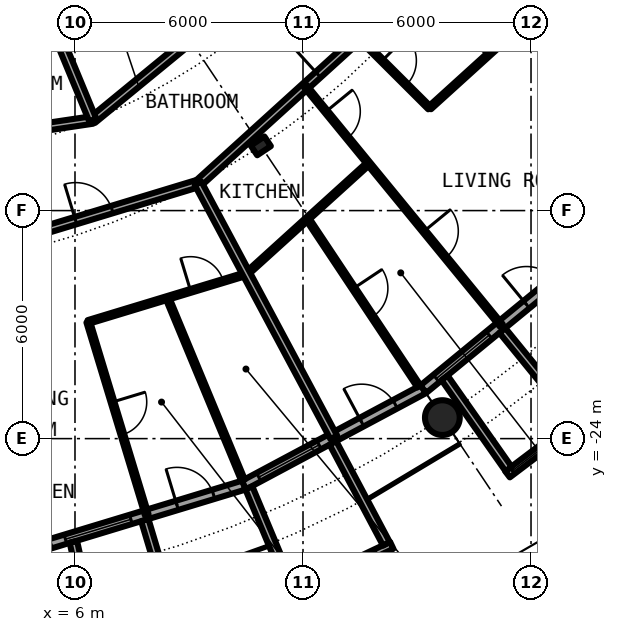
"""IFC4 building model, lengths in metres.
Left out: names, types, materials, properties, quantities, classifications, styles, units other than length and angle.
Written with IfcOpenShell. Run it as: python <this file> out.ifc"""

import sys

from ifc_helpers import new_model, si_unit, direction, frame, frame_2d, origin, origin_2d, place, context, subcontext, project, spatial, rectangle, circle, hollow_circle, i_section, extrude, element, fill, save


model = new_model("IFC4")
c1 = context("Model", 3, precision=1e-05, world=origin(), true_north=direction((0.0, 1.0)))
c2 = subcontext(c1, "Body", "Model", "MODEL_VIEW")
j1 = project(units=[si_unit("LENGTHUNIT", "METRE"), si_unit("PLANEANGLEUNIT", "RADIAN")], contexts=[c1])
p1 = place(None, origin())
s1 = spatial("IfcSite", under=j1, at=p1, CompositionType="ELEMENT")
p2 = place(p1, origin())
s2 = spatial("IfcBuilding", under=s1, at=p2, CompositionType="ELEMENT")
p3 = place(p2, frame((0.0, 0.0, 129.95)))
s3 = spatial("IfcBuildingStorey", under=s2, at=p3, CompositionType="ELEMENT", Elevation=129.95)
p4 = place(p3, frame((15.667, -23.448, 0.0), z_axis=(0.0, 0.0, 1.0), x_axis=(1.0, 0.0, 0.0)))
e1 = element("IfcColumn", 1, at=p4, inside=s3, PredefinedType="COLUMN", context=c2, shape_type="SweptSolid", body=[
    extrude(hollow_circle(Radius=0.457, WallThickness=0.04, at=origin_2d()), origin(), (0.0, 0.0, 1.0), 3.05),
])
p5 = place(p3, frame((10.889, -16.297, 0.0), z_axis=(0.0, 0.0, 1.0), x_axis=(0.55557023302, -0.831469612303, 0.0)))
e2 = element("IfcColumn", 2, at=p5, inside=s3, PredefinedType="COLUMN", context=c2, shape_type="SweptSolid", body=[
    extrude(i_section(OverallWidth=0.307, OverallDepth=0.432, WebThickness=0.021, FlangeThickness=0.04, FilletRadius=0.027, at=origin_2d()), origin(), (0.0, 0.0, 1.0), 3.05),
])
p6 = place(p3, frame((5.326, -26.775, 0.0), z_axis=(0.0, 0.0, 1.0), x_axis=(0.956965678721, 0.290201119486, 0.0)))
e3 = element("IfcWall", 3, at=p6, inside=s3, PredefinedType="SOLIDWALL", context=c2, shape_type="SweptSolid", body=[
    extrude(rectangle(XDim=5.351, YDim=0.25, at=frame_2d((2.676, 0.0))), origin(), (0.0, 0.0, 1.0), 2.7),
])
p7 = place(p6, frame((0.441, 0.0, 0.3)))
e4 = element("IfcOpeningElement", 4, at=p7, cuts=e3, PredefinedType="OPENING", context=c2, shape_type="SweptSolid", body=[
    extrude(rectangle(XDim=1.8, YDim=2.1, at=frame_2d((0.9, 1.05))), frame((0.0, 0.135, 0.0), z_axis=(0.0, -1.0, 0.0), x_axis=(1.0, 0.0, 0.0)), (0.0, 0.0, 1.0), 0.27),
])
p8 = place(p6, frame((3.51, 0.0, 0.0)))
e5 = element("IfcOpeningElement", 5, at=p8, cuts=e3, PredefinedType="OPENING", context=c2, shape_type="SweptSolid", body=[
    extrude(rectangle(XDim=1.0, YDim=2.2, at=frame_2d((0.5, 1.1))), frame((0.0, 0.135, 0.0), z_axis=(0.0, -1.0, 0.0), x_axis=(1.0, 0.0, 0.0)), (0.0, 0.0, 1.0), 0.27),
])
p9 = place(p3, frame((5.957, -26.715, -0.03), z_axis=(0.0, 0.0, 1.0), x_axis=(0.217857287091, -0.975980636315, 0.0)))
e6 = element("IfcWall", 6, at=p9, inside=s3, PredefinedType="SOLIDWALL", context=c2, shape_type="SweptSolid", body=[
    extrude(rectangle(XDim=2.928, YDim=0.2, at=frame_2d((1.464, 0.0))), origin(), (0.0, 0.0, 1.0), 2.73),
])
p10 = place(p3, frame((7.837, -26.144, -0.03), z_axis=(0.0, 0.0, 1.0), x_axis=(0.287064767992, -0.957911174889, 0.0)))
e7 = element("IfcWall", 7, at=p10, inside=s3, PredefinedType="SOLIDWALL", context=c2, shape_type="SweptSolid", body=[
    extrude(rectangle(XDim=3.006, YDim=0.2, at=frame_2d((1.503, 0.0))), origin(), (0.0, 0.0, 1.0), 2.73),
])
p11 = place(p3, frame((10.447, -25.222, 0.0), z_axis=(0.0, 0.0, 1.0), x_axis=(0.881915646801, 0.471407246368, 0.0)))
e8 = element("IfcWall", 8, at=p11, inside=s3, PredefinedType="SOLIDWALL", context=c2, shape_type="SweptSolid", body=[
    extrude(rectangle(XDim=5.352, YDim=0.25, at=frame_2d((2.676, 0.0))), origin(), (0.0, 0.0, 1.0), 2.7),
])
p12 = place(p11, frame((0.441, 0.0, 0.3)))
e9 = element("IfcOpeningElement", 9, at=p12, cuts=e8, PredefinedType="OPENING", context=c2, shape_type="SweptSolid", body=[
    extrude(rectangle(XDim=1.8, YDim=2.1, at=frame_2d((0.9, 1.05))), frame((0.0, 0.135, 0.0), z_axis=(0.0, -1.0, 0.0), x_axis=(1.0, 0.0, 0.0)), (0.0, 0.0, 1.0), 0.27),
])
p13 = place(p11, frame((3.51, 0.0, 0.0)))
e10 = element("IfcOpeningElement", 10, at=p13, cuts=e8, PredefinedType="OPENING", context=c2, shape_type="SweptSolid", body=[
    extrude(rectangle(XDim=1.0, YDim=2.2, at=frame_2d((0.5, 1.1))), frame((0.0, 0.135, 0.0), z_axis=(0.0, -1.0, 0.0), x_axis=(1.0, 0.0, 0.0)), (0.0, 0.0, 1.0), 0.27),
])
p14 = place(p3, frame((11.629, -28.088, -0.03), z_axis=(0.0, 0.0, 1.0), x_axis=(0.904000060331, 0.427532327342, 0.0)))
e11 = element("IfcWall", 11, at=p14, inside=s3, PredefinedType="SOLIDWALL", context=c2, shape_type="SweptSolid", body=[
    extrude(rectangle(XDim=2.993, YDim=0.2, at=frame_2d((1.497, 0.0))), origin(), (0.0, 0.0, 1.0), 2.73),
])
p15 = place(p14, frame((0.457, 0.0, 0.33)))
e12 = element("IfcOpeningElement", 12, at=p15, cuts=e11, PredefinedType="OPENING", context=c2, shape_type="SweptSolid", body=[
    extrude(circle(Radius=1.04, at=frame_2d((1.04, 1.04))), frame((0.0, 0.11, 0.0), z_axis=(0.0, -1.0, 0.0), x_axis=(1.0, 0.0, 0.0)), (0.0, 0.0, 1.0), 0.22),
])
p16 = place(p3, frame((10.575, -25.295, -0.03), z_axis=(0.0, 0.0, 1.0), x_axis=(0.385697364644, -0.922625353492, 0.0)))
e13 = element("IfcWall", 13, at=p16, inside=s3, PredefinedType="SOLIDWALL", context=c2, shape_type="SweptSolid", body=[
    extrude(rectangle(XDim=2.883, YDim=0.2, at=frame_2d((1.442, 0.0))), origin(), (0.0, 0.0, 1.0), 2.73),
])
p17 = place(p3, frame((12.787, -24.113, -0.03), z_axis=(0.0, 0.0, 1.0), x_axis=(0.468365282436, -0.883534924159, 0.0)))
e14 = element("IfcWall", 14, at=p17, inside=s3, PredefinedType="SOLIDWALL", context=c2, shape_type="SweptSolid", body=[
    extrude(rectangle(XDim=3.006, YDim=0.2, at=frame_2d((1.503, 0.0))), origin(), (0.0, 0.0, 1.0), 2.73),
])
p18 = place(p3, frame((15.167, -22.699, 0.0), z_axis=(0.0, 0.0, 1.0), x_axis=(0.773019449054, 0.634382322723, 0.0)))
e15 = element("IfcWall", 15, at=p18, inside=s3, PredefinedType="SOLIDWALL", context=c2, shape_type="SweptSolid", body=[
    extrude(rectangle(XDim=5.352, YDim=0.25, at=frame_2d((2.676, 0.0))), origin(), (0.0, 0.0, 1.0), 2.7),
])
p19 = place(p18, frame((0.441, 0.0, 0.3)))
e16 = element("IfcOpeningElement", 16, at=p19, cuts=e15, PredefinedType="OPENING", context=c2, shape_type="SweptSolid", body=[
    extrude(rectangle(XDim=1.8, YDim=2.1, at=frame_2d((0.9, 1.05))), frame((0.0, 0.135, 0.0), z_axis=(0.0, -1.0, 0.0), x_axis=(1.0, 0.0, 0.0)), (0.0, 0.0, 1.0), 0.27),
])
p20 = place(p18, frame((3.51, 0.0, 0.0)))
e17 = element("IfcOpeningElement", 17, at=p20, cuts=e15, PredefinedType="OPENING", context=c2, shape_type="SweptSolid", body=[
    extrude(rectangle(XDim=1.0, YDim=2.2, at=frame_2d((0.5, 1.1))), frame((0.0, 0.135, 0.0), z_axis=(0.0, -1.0, 0.0), x_axis=(1.0, 0.0, 0.0)), (0.0, 0.0, 1.0), 0.27),
])
p21 = place(p3, frame((17.382, -24.94, -0.03), z_axis=(0.0, 0.0, 1.0), x_axis=(0.797456837111, 0.603375996329, 0.0)))
e18 = element("IfcWall", 18, at=p21, inside=s3, PredefinedType="SOLIDWALL", context=c2, shape_type="SweptSolid", body=[
    extrude(rectangle(XDim=2.391, YDim=0.2, at=frame_2d((1.196, 0.0))), origin(), (0.0, 0.0, 1.0), 2.73),
])
p22 = place(p21, frame((0.156, 0.0, 0.33)))
e19 = element("IfcOpeningElement", 19, at=p22, cuts=e18, PredefinedType="OPENING", context=c2, shape_type="SweptSolid", body=[
    extrude(circle(Radius=1.04, at=frame_2d((1.04, 1.04))), frame((0.0, 0.11, 0.0), z_axis=(0.0, -1.0, 0.0), x_axis=(1.0, 0.0, 0.0)), (0.0, 0.0, 1.0), 0.22),
])
p23 = place(p3, frame((15.726, -22.402, -0.03), z_axis=(0.0, 0.0, 1.0), x_axis=(0.574826383135, -0.818275399393, 0.0)))
e20 = element("IfcWall", 20, at=p23, inside=s3, PredefinedType="SOLIDWALL", context=c2, shape_type="SweptSolid", body=[
    extrude(rectangle(XDim=2.929, YDim=0.2, at=frame_2d((1.465, 0.0))), origin(), (0.0, 0.0, 1.0), 2.73),
])
p24 = place(p3, frame((17.246, -21.155, -0.03), z_axis=(0.0, 0.0, 1.0), x_axis=(0.631741648902, -0.775179004516, 0.0)))
e21 = element("IfcWall", 21, at=p24, inside=s3, PredefinedType="SOLIDWALL", context=c2, shape_type="SweptSolid", body=[
    extrude(rectangle(XDim=3.006, YDim=0.2, at=frame_2d((1.503, 0.0))), origin(), (0.0, 0.0, 1.0), 2.73),
])
p25 = place(p3, frame((6.346, -20.931, 0.0), z_axis=(0.0, 0.0, 1.0), x_axis=(0.956923957423, 0.290338663821, 0.0)))
e22 = element("IfcWall", 22, at=p25, inside=s3, PredefinedType="PARTITIONING", context=c2, shape_type="SweptSolid", body=[
    extrude(rectangle(XDim=4.357, YDim=0.1, at=frame_2d((2.178, 0.0))), origin(), (0.0, 0.0, 1.0), 2.7),
])
p26 = place(p25, frame((2.818, 0.0, 0.0)))
e23 = element("IfcOpeningElement", 23, at=p26, cuts=e22, PredefinedType="OPENING", context=c2, shape_type="SweptSolid", body=[
    extrude(rectangle(XDim=0.9, YDim=2.3, at=frame_2d((0.45, 1.15))), frame((0.0, 0.06, 0.0), z_axis=(0.0, -1.0, 0.0), x_axis=(1.0, 0.0, 0.0)), (0.0, 0.0, 1.0), 0.12),
])
p27 = place(p3, frame((10.513, -19.668, 0.0), z_axis=(0.0, 0.0, 1.0), x_axis=(0.74092137325, 0.671591779775, 0.0)))
e24 = element("IfcWall", 24, at=p27, inside=s3, PredefinedType="PARTITIONING", context=c2, shape_type="SweptSolid", body=[
    extrude(rectangle(XDim=4.342, YDim=0.1, at=frame_2d((2.171, 0.0))), origin(), (0.0, 0.0, 1.0), 2.7),
])
p28 = place(p3, frame((15.336, -15.296, 0.0), z_axis=(0.0, 0.0, 1.0), x_axis=(0.740895789277, 0.671620003746, 0.0)))
e25 = element("IfcWall", 25, at=p28, inside=s3, PredefinedType="PARTITIONING", context=c2, shape_type="SweptSolid", body=[
    extrude(rectangle(XDim=4.331, YDim=0.1, at=frame_2d((2.166, 0.0))), origin(), (0.0, 0.0, 1.0), 2.7),
])
p29 = place(p28, frame((2.796, 0.0, 0.0)))
e26 = element("IfcOpeningElement", 26, at=p29, cuts=e25, PredefinedType="OPENING", context=c2, shape_type="SweptSolid", body=[
    extrude(rectangle(XDim=0.9, YDim=2.3, at=frame_2d((0.45, 1.15))), frame((0.0, 0.06, 0.0), z_axis=(0.0, -1.0, 0.0), x_axis=(1.0, 0.0, 0.0)), (0.0, 0.0, 1.0), 0.12),
])
p30 = place(p3, frame((1.921, -19.506, 0.0), z_axis=(0.0, 0.0, 1.0), x_axis=(0.956929842753, 0.290319265721, 0.0)))
e27 = element("IfcWall", 27, at=p30, inside=s3, PredefinedType="PARTITIONING", context=c2, shape_type="SweptSolid", body=[
    extrude(rectangle(XDim=7.647, YDim=0.2, at=frame_2d((3.824, 0.0))), origin(), (0.0, 0.0, 1.0), 2.39),
])
p31 = place(p30, frame((4.28, 0.0, 0.0)))
e28 = element("IfcOpeningElement", 28, at=p31, cuts=e27, PredefinedType="OPENING", context=c2, shape_type="SweptSolid", body=[
    extrude(rectangle(XDim=1.0, YDim=2.3, at=frame_2d((0.5, 1.15))), frame((0.0, 0.11, 0.0), z_axis=(0.0, -1.0, 0.0), x_axis=(1.0, 0.0, 0.0)), (0.0, 0.0, 1.0), 0.22),
])
p32 = place(p3, frame((9.249, -17.282, 0.0), z_axis=(0.0, 0.0, 1.0), x_axis=(0.740525495356, 0.672028266316, 0.0)))
e29 = element("IfcWall", 29, at=p32, inside=s3, PredefinedType="PARTITIONING", context=c2, shape_type="SweptSolid", body=[
    extrude(rectangle(XDim=5.753, YDim=0.2, at=frame_2d((2.876, 0.0))), origin(), (0.0, 0.0, 1.0), 2.7),
])
p33 = place(p32, frame((4.253, 0.0, 0.0)))
e30 = element("IfcOpeningElement", 30, at=p33, cuts=e29, PredefinedType="OPENING", context=c2, shape_type="SweptSolid", body=[
    extrude(rectangle(XDim=1.0, YDim=2.3, at=frame_2d((0.5, 1.15))), frame((0.0, 0.11, 0.0), z_axis=(0.0, -1.0, 0.0), x_axis=(1.0, 0.0, 0.0)), (0.0, 0.0, 1.0), 0.22),
])
p34 = place(p3, frame((-1.658, -16.819, 0.0), z_axis=(0.0, 0.0, 1.0), x_axis=(0.989191327347, 0.146630549004, 0.0)))
e31 = element("IfcWall", 31, at=p34, inside=s3, PredefinedType="PARTITIONING", context=c2, shape_type="SweptSolid", body=[
    extrude(rectangle(XDim=8.212, YDim=0.2, at=frame_2d((4.106, 0.0))), origin(), (0.0, 0.0, 1.0), 2.7),
])
p35 = place(p34, frame((3.607, 0.0, 0.0)))
e32 = element("IfcOpeningElement", 32, at=p35, cuts=e31, PredefinedType="OPENING", context=c2, shape_type="SweptSolid", body=[
    extrude(rectangle(XDim=1.0, YDim=2.3, at=frame_2d((0.5, 1.15))), frame((0.0, 0.11, 0.0), z_axis=(0.0, -1.0, 0.0), x_axis=(1.0, 0.0, 0.0)), (0.0, 0.0, 1.0), 0.22),
])
p36 = place(p3, frame((6.467, -15.614, 0.0), z_axis=(0.0, 0.0, 1.0), x_axis=(0.773074935257, 0.634314704605, 0.0)))
e33 = element("IfcWall", 33, at=p36, inside=s3, PredefinedType="PARTITIONING", context=c2, shape_type="SweptSolid", body=[
    extrude(rectangle(XDim=9.809, YDim=0.2, at=frame_2d((4.904, 0.0))), origin(), (0.0, 0.0, 1.0), 2.7),
])
p37 = place(p36, frame((4.407, 0.0, 0.0)))
e34 = element("IfcOpeningElement", 34, at=p37, cuts=e33, PredefinedType="OPENING", context=c2, shape_type="SweptSolid", body=[
    extrude(rectangle(XDim=1.0, YDim=2.3, at=frame_2d((0.5, 1.15))), frame((0.0, 0.11, 0.0), z_axis=(0.0, -1.0, 0.0), x_axis=(1.0, 0.0, 0.0)), (0.0, 0.0, 1.0), 0.22),
])
p38 = place(p3, frame((2.954, -7.132, 0.0), z_axis=(0.0, 0.0, 1.0), x_axis=(0.382646942224, -0.923894646378, 0.0)))
e35 = element("IfcWall", 35, at=p38, inside=s3, PredefinedType="PARTITIONING", context=c2, shape_type="SweptSolid", body=[
    extrude(rectangle(XDim=9.181, YDim=0.2, at=frame_2d((4.59, 0.0))), origin(), (0.0, 0.0, 1.0), 2.7),
])
p39 = place(p3, frame((6.349, -20.93, 0.0), z_axis=(0.0, 0.0, 1.0), x_axis=(0.290172218727, -0.956974442438, 0.0)))
e36 = element("IfcWall", 36, at=p39, inside=s3, PredefinedType="PARTITIONING", context=c2, shape_type="SweptSolid", body=[
    extrude(rectangle(XDim=5.303, YDim=0.1, at=frame_2d((2.652, 0.0))), origin(), (0.0, 0.0, 1.0), 2.7),
])
p40 = place(p39, frame((2.202, 0.0, 0.0)))
e37 = element("IfcOpeningElement", 37, at=p40, cuts=e36, PredefinedType="OPENING", context=c2, shape_type="SweptSolid", body=[
    extrude(rectangle(XDim=0.9, YDim=2.3, at=frame_2d((0.45, 1.15))), frame((0.0, 0.06, 0.0), z_axis=(0.0, -1.0, 0.0), x_axis=(1.0, 0.0, 0.0)), (0.0, 0.0, 1.0), 0.12),
])
p41 = place(p3, frame((8.431, -20.298, 0.0), z_axis=(0.0, 0.0, 1.0), x_axis=(0.383480536297, -0.923548958248, 0.0)))
e38 = element("IfcWall", 38, at=p41, inside=s3, PredefinedType="PARTITIONING", context=c2, shape_type="SweptSolid", body=[
    extrude(rectangle(XDim=5.195, YDim=0.1, at=frame_2d((2.598, 0.0))), origin(), (0.0, 0.0, 1.0), 2.7),
])
p42 = place(p3, frame((9.239, -17.286, 0.0), z_axis=(0.0, 0.0, 1.0), x_axis=(0.471439510802, -0.881898399848, 0.0)))
e39 = element("IfcWall", 39, at=p42, inside=s3, PredefinedType="PARTITIONING", context=c2, shape_type="SweptSolid", body=[
    extrude(rectangle(XDim=7.575, YDim=0.2, at=frame_2d((3.787, 0.0))), origin(), (0.0, 0.0, 1.0), 2.7),
])
p43 = place(p3, frame((12.062, -14.727, 0.0), z_axis=(0.0, 0.0, 1.0), x_axis=(0.633664062855, -0.773608334654, 0.0)))
e40 = element("IfcWall", 40, at=p43, inside=s3, PredefinedType="PARTITIONING", context=c2, shape_type="SweptSolid", body=[
    extrude(rectangle(XDim=8.138, YDim=0.1, at=frame_2d((4.069, 0.0))), origin(), (0.0, 0.0, 1.0), 2.7),
])
p44 = place(p43, frame((0.861, 0.0, 0.0)))
e41 = element("IfcOpeningElement", 41, at=p44, cuts=e40, PredefinedType="OPENING", context=c2, shape_type="SweptSolid", body=[
    extrude(rectangle(XDim=0.9, YDim=2.3, at=frame_2d((0.45, 1.15))), frame((0.0, 0.06, 0.0), z_axis=(0.0, -1.0, 0.0), x_axis=(1.0, 0.0, 0.0)), (0.0, 0.0, 1.0), 0.12),
])
p45 = place(p43, frame((4.931, 0.0, 0.0)))
e42 = element("IfcOpeningElement", 42, at=p45, cuts=e40, PredefinedType="OPENING", context=c2, shape_type="SweptSolid", body=[
    extrude(rectangle(XDim=0.9, YDim=2.3, at=frame_2d((0.45, 1.15))), frame((0.0, 0.06, 0.0), z_axis=(0.0, -1.0, 0.0), x_axis=(1.0, 0.0, 0.0)), (0.0, 0.0, 1.0), 0.12),
])
p46 = place(p3, frame((12.115, -18.213, 0.0), z_axis=(0.0, 0.0, 1.0), x_axis=(0.553913391217, -0.832574294, 0.0)))
e43 = element("IfcWall", 43, at=p46, inside=s3, PredefinedType="PARTITIONING", context=c2, shape_type="SweptSolid", body=[
    extrude(rectangle(XDim=5.301, YDim=0.1, at=frame_2d((2.65, 0.0))), origin(), (0.0, 0.0, 1.0), 2.7),
])
p47 = place(p46, frame((2.2, 0.0, 0.0)))
e44 = element("IfcOpeningElement", 44, at=p47, cuts=e43, PredefinedType="OPENING", context=c2, shape_type="SweptSolid", body=[
    extrude(rectangle(XDim=0.9, YDim=2.3, at=frame_2d((0.45, 1.15))), frame((0.0, 0.06, 0.0), z_axis=(0.0, -1.0, 0.0), x_axis=(1.0, 0.0, 0.0)), (0.0, 0.0, 1.0), 0.12),
])
p48 = place(p3, frame((13.474, -13.448, 0.0), z_axis=(0.0, 0.0, 1.0), x_axis=(0.707851299421, -0.706361478217, 0.0)))
e45 = element("IfcWall", 45, at=p48, inside=s3, PredefinedType="PARTITIONING", context=c2, shape_type="SweptSolid", body=[
    extrude(rectangle(XDim=2.622, YDim=0.1, at=frame_2d((1.311, 0.0))), origin(), (0.0, 0.0, 1.0), 2.7),
])
p49 = place(p48, frame((0.861, 0.0, 0.0)))
e46 = element("IfcOpeningElement", 46, at=p49, cuts=e45, PredefinedType="OPENING", context=c2, shape_type="SweptSolid", body=[
    extrude(rectangle(XDim=0.9, YDim=2.3, at=frame_2d((0.45, 1.15))), frame((0.0, 0.06, 0.0), z_axis=(0.0, -1.0, 0.0), x_axis=(1.0, 0.0, 0.0)), (0.0, 0.0, 1.0), 0.12),
])
p50 = place(p3, frame((14.882, -12.171, 0.0), z_axis=(0.0, 0.0, 1.0), x_axis=(0.774162545943, -0.632986850147, 0.0)))
e47 = element("IfcWall", 47, at=p50, inside=s3, PredefinedType="PARTITIONING", context=c2, shape_type="SweptSolid", body=[
    extrude(rectangle(XDim=2.649, YDim=0.1, at=frame_2d((1.325, 0.0))), origin(), (0.0, 0.0, 1.0), 2.7),
])
p51 = place(p3, frame((16.477, -11.009, 0.0), z_axis=(0.0, 0.0, 1.0), x_axis=(0.831467903109, -0.555572791, 0.0)))
e48 = element("IfcWall", 48, at=p51, inside=s3, PredefinedType="PARTITIONING", context=c2, shape_type="SweptSolid", body=[
    extrude(rectangle(XDim=7.358, YDim=0.2, at=frame_2d((3.679, 0.0))), origin(), (0.0, 0.0, 1.0), 2.7),
])
p52 = place(p7, origin())
e49 = element("IfcWindow", 49, at=p52, inside=s3, PartitioningType="SINGLE_PANEL", PredefinedType="WINDOW", context=c2, shape_type="SweptSolid", body=[
    extrude(rectangle(XDim=1.8, YDim=2.1, at=frame_2d((0.9, 1.05))), frame((0.0, 0.03, 0.0), z_axis=(0.0, -1.0, 0.0), x_axis=(1.0, 0.0, 0.0)), (0.0, 0.0, 1.0), 0.06),
])
fill(e4, e49)
p53 = place(p8, origin())
e50 = element("IfcDoor", 50, at=p53, inside=s3, OperationType="SINGLE_SWING_LEFT", PredefinedType="DOOR", context=c2, shape_type="SweptSolid", body=[
    extrude(rectangle(XDim=1.0, YDim=2.2, at=frame_2d((0.5, 1.1))), frame((0.0, 0.025, 0.0), z_axis=(0.0, -1.0, 0.0), x_axis=(1.0, 0.0, 0.0)), (0.0, 0.0, 1.0), 0.05),
])
fill(e5, e50)
p54 = place(p12, origin())
e51 = element("IfcWindow", 51, at=p54, inside=s3, PartitioningType="SINGLE_PANEL", PredefinedType="WINDOW", context=c2, shape_type="SweptSolid", body=[
    extrude(rectangle(XDim=1.8, YDim=2.1, at=frame_2d((0.9, 1.05))), frame((0.0, 0.03, 0.0), z_axis=(0.0, -1.0, 0.0), x_axis=(1.0, 0.0, 0.0)), (0.0, 0.0, 1.0), 0.06),
])
fill(e9, e51)
p55 = place(p15, origin())
e52 = element("IfcWindow", 52, at=p55, inside=s3, PartitioningType="SINGLE_PANEL", PredefinedType="WINDOW", context=c2, shape_type="SweptSolid", body=[
    extrude(circle(Radius=1.04, at=frame_2d((1.04, 1.04))), frame((0.0, 0.03, 0.0), z_axis=(0.0, -1.0, 0.0), x_axis=(1.0, 0.0, 0.0)), (0.0, 0.0, 1.0), 0.06),
])
fill(e12, e52)
p56 = place(p13, origin())
e53 = element("IfcDoor", 53, at=p56, inside=s3, OperationType="SINGLE_SWING_LEFT", PredefinedType="DOOR", context=c2, shape_type="SweptSolid", body=[
    extrude(rectangle(XDim=1.0, YDim=2.2, at=frame_2d((0.5, 1.1))), frame((0.0, 0.025, 0.0), z_axis=(0.0, -1.0, 0.0), x_axis=(1.0, 0.0, 0.0)), (0.0, 0.0, 1.0), 0.05),
])
fill(e10, e53)
p57 = place(p19, origin())
e54 = element("IfcWindow", 54, at=p57, inside=s3, PartitioningType="SINGLE_PANEL", PredefinedType="WINDOW", context=c2, shape_type="SweptSolid", body=[
    extrude(rectangle(XDim=1.8, YDim=2.1, at=frame_2d((0.9, 1.05))), frame((0.0, 0.03, 0.0), z_axis=(0.0, -1.0, 0.0), x_axis=(1.0, 0.0, 0.0)), (0.0, 0.0, 1.0), 0.06),
])
fill(e16, e54)
p58 = place(p22, origin())
e55 = element("IfcWindow", 55, at=p58, inside=s3, PartitioningType="SINGLE_PANEL", PredefinedType="WINDOW", context=c2, shape_type="SweptSolid", body=[
    extrude(circle(Radius=1.04, at=frame_2d((1.04, 1.04))), frame((0.0, 0.03, 0.0), z_axis=(0.0, -1.0, 0.0), x_axis=(1.0, 0.0, 0.0)), (0.0, 0.0, 1.0), 0.06),
])
fill(e19, e55)
p59 = place(p20, origin())
e56 = element("IfcDoor", 56, at=p59, inside=s3, OperationType="SINGLE_SWING_LEFT", PredefinedType="DOOR", context=c2, shape_type="SweptSolid", body=[
    extrude(rectangle(XDim=1.0, YDim=2.2, at=frame_2d((0.5, 1.1))), frame((0.0, 0.025, 0.0), z_axis=(0.0, -1.0, 0.0), x_axis=(1.0, 0.0, 0.0)), (0.0, 0.0, 1.0), 0.05),
])
fill(e17, e56)
p60 = place(p31, origin())
e57 = element("IfcDoor", 57, at=p60, inside=s3, OperationType="SINGLE_SWING_RIGHT", PredefinedType="DOOR", context=c2, shape_type="SweptSolid", body=[
    extrude(rectangle(XDim=1.0, YDim=2.3, at=frame_2d((0.5, 1.15))), frame((0.0, 0.025, 0.0), z_axis=(0.0, -1.0, 0.0), x_axis=(1.0, 0.0, 0.0)), (0.0, 0.0, 1.0), 0.05),
])
fill(e28, e57)
p61 = place(p40, origin())
e58 = element("IfcDoor", 58, at=p61, inside=s3, OperationType="SINGLE_SWING_RIGHT", PredefinedType="DOOR", context=c2, shape_type="SweptSolid", body=[
    extrude(rectangle(XDim=0.9, YDim=2.3, at=frame_2d((0.45, 1.15))), frame((0.0, 0.025, 0.0), z_axis=(0.0, -1.0, 0.0), x_axis=(1.0, 0.0, 0.0)), (0.0, 0.0, 1.0), 0.05),
])
fill(e37, e58)
p62 = place(p26, origin())
e59 = element("IfcDoor", 59, at=p62, inside=s3, OperationType="SINGLE_SWING_RIGHT", PredefinedType="DOOR", context=c2, shape_type="SweptSolid", body=[
    extrude(rectangle(XDim=0.9, YDim=2.3, at=frame_2d((0.45, 1.15))), frame((0.0, 0.025, 0.0), z_axis=(0.0, -1.0, 0.0), x_axis=(1.0, 0.0, 0.0)), (0.0, 0.0, 1.0), 0.05),
])
fill(e23, e59)
p63 = place(p33, origin())
e60 = element("IfcDoor", 60, at=p63, inside=s3, OperationType="SINGLE_SWING_RIGHT", PredefinedType="DOOR", context=c2, shape_type="SweptSolid", body=[
    extrude(rectangle(XDim=1.0, YDim=2.3, at=frame_2d((0.5, 1.15))), frame((0.0, 0.025, 0.0), z_axis=(0.0, -1.0, 0.0), x_axis=(1.0, 0.0, 0.0)), (0.0, 0.0, 1.0), 0.05),
])
fill(e30, e60)
p64 = place(p49, origin())
e61 = element("IfcDoor", 61, at=p64, inside=s3, OperationType="SINGLE_SWING_LEFT", PredefinedType="DOOR", context=c2, shape_type="SweptSolid", body=[
    extrude(rectangle(XDim=0.9, YDim=2.3, at=frame_2d((0.45, 1.15))), frame((0.0, 0.025, 0.0), z_axis=(0.0, -1.0, 0.0), x_axis=(1.0, 0.0, 0.0)), (0.0, 0.0, 1.0), 0.05),
])
fill(e46, e61)
p65 = place(p44, origin())
e62 = element("IfcDoor", 62, at=p65, inside=s3, OperationType="SINGLE_SWING_LEFT", PredefinedType="DOOR", context=c2, shape_type="SweptSolid", body=[
    extrude(rectangle(XDim=0.9, YDim=2.3, at=frame_2d((0.45, 1.15))), frame((0.0, 0.025, 0.0), z_axis=(0.0, -1.0, 0.0), x_axis=(1.0, 0.0, 0.0)), (0.0, 0.0, 1.0), 0.05),
])
fill(e41, e62)
p66 = place(p45, origin())
e63 = element("IfcDoor", 63, at=p66, inside=s3, OperationType="SINGLE_SWING_RIGHT", PredefinedType="DOOR", context=c2, shape_type="SweptSolid", body=[
    extrude(rectangle(XDim=0.9, YDim=2.3, at=frame_2d((0.45, 1.15))), frame((0.0, 0.025, 0.0), z_axis=(0.0, -1.0, 0.0), x_axis=(1.0, 0.0, 0.0)), (0.0, 0.0, 1.0), 0.05),
])
fill(e42, e63)
p67 = place(p47, origin())
e64 = element("IfcDoor", 64, at=p67, inside=s3, OperationType="SINGLE_SWING_LEFT", PredefinedType="DOOR", context=c2, shape_type="SweptSolid", body=[
    extrude(rectangle(XDim=0.9, YDim=2.3, at=frame_2d((0.45, 1.15))), frame((0.0, 0.025, 0.0), z_axis=(0.0, -1.0, 0.0), x_axis=(1.0, 0.0, 0.0)), (0.0, 0.0, 1.0), 0.05),
])
fill(e44, e64)
save(model, sys.argv[1])
